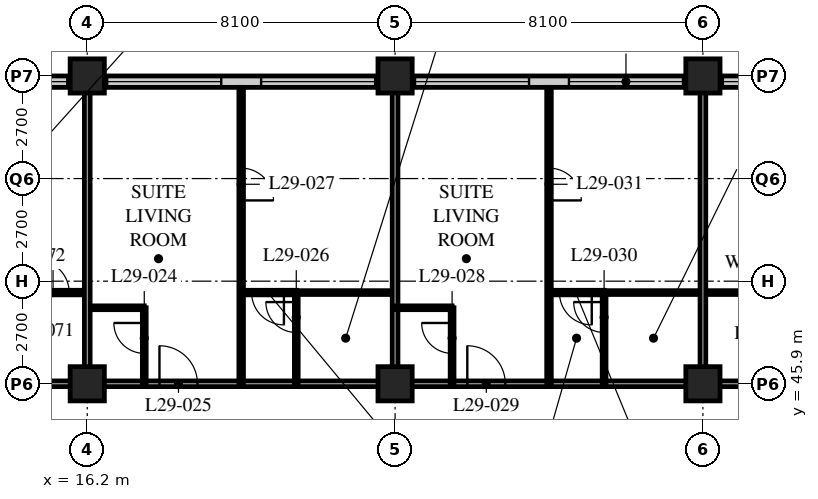
"""IFC4 building model, lengths in metres.
Left out: names, types, materials, properties, quantities, classifications, styles, units other than length and angle.
Written with IfcOpenShell. Run it as: python <this file> out.ifc"""

import sys

from ifc_helpers import new_model, si_unit, direction, frame, frame_2d, origin, origin_2d, place, context, subcontext, project, spatial, rectangle, hollow_rectangle, extrude, element, fill, save


model = new_model("IFC4")
c1 = context("Model", 3, precision=1e-05, world=origin(), true_north=direction((0.0, 1.0)))
c2 = subcontext(c1, "Body", "Model", "MODEL_VIEW")
j1 = project(units=[si_unit("LENGTHUNIT", "METRE"), si_unit("PLANEANGLEUNIT", "RADIAN")], contexts=[c1])
p1 = place(None, origin())
s1 = spatial("IfcSite", under=j1, at=p1, CompositionType="ELEMENT")
p2 = place(p1, origin())
s2 = spatial("IfcBuilding", under=s1, at=p2, CompositionType="ELEMENT")
p3 = place(p2, frame((0.0, 0.0, 117.0)))
s3 = spatial("IfcBuildingStorey", under=s2, at=p3, CompositionType="ELEMENT", Elevation=117.0)
for number, where, z_axis, x_axis in (
    (1, (16.2, 45.9, 0.0), (0.0, 0.0, 1.0), (1.0, 0.0, 0.0)),
    (2, (16.2, 54.0, 0.0), (0.0, 0.0, 1.0), (1.0, 0.0, 0.0)),
    (3, (24.3, 45.9, 0.0), (0.0, 0.0, 1.0), (1.0, 0.0, 0.0)),
    (4, (24.3, 54.0, 0.0), (0.0, 0.0, 1.0), (1.0, 0.0, 0.0)),
    (5, (32.4, 45.9, 0.0), (0.0, 0.0, 1.0), (1.0, 0.0, 0.0)),
    (6, (32.4, 54.0, 0.0), (0.0, 0.0, 1.0), (1.0, 0.0, 0.0)),
):
    element("IfcColumn", number, at=place(p3, frame(where, z_axis=z_axis, x_axis=x_axis)), inside=s3, PredefinedType="COLUMN", context=c2, shape_type="SweptSolid", body=[
        extrude(hollow_rectangle(XDim=0.9, YDim=0.9, WallThickness=0.09, at=origin_2d()), origin(), (0.0, 0.0, 1.0), 3.4),
    ])
p4 = place(p3, frame((48.3, 53.85, 0.0), z_axis=(0.0, 0.0, 1.0), x_axis=(-1.0, 0.0, 0.0)))
e7 = element("IfcWall", 7, at=p4, inside=s3, PredefinedType="SOLIDWALL", context=c2, shape_type="SweptSolid", body=[
    extrude(rectangle(XDim=40.2, YDim=0.3, at=frame_2d((20.1, 0.0))), origin(), (0.0, 0.0, 1.0), 3.19),
])
p5 = place(p4, frame((0.225, 0.0, 0.9)))
e8 = element("IfcOpeningElement", 8, at=p5, cuts=e7, PredefinedType="OPENING", context=c2, shape_type="SweptSolid", body=[
    extrude(rectangle(XDim=3.0, YDim=2.0, at=frame_2d((1.5, 1.0))), frame((0.0, 0.16, 0.0), z_axis=(0.0, -1.0, 0.0), x_axis=(1.0, 0.0, 0.0)), (0.0, 0.0, 1.0), 0.32),
])
p6 = place(p4, frame((4.275, 0.0, 0.9)))
e9 = element("IfcOpeningElement", 9, at=p6, cuts=e7, PredefinedType="OPENING", context=c2, shape_type="SweptSolid", body=[
    extrude(rectangle(XDim=3.0, YDim=2.0, at=frame_2d((1.5, 1.0))), frame((0.0, 0.16, 0.0), z_axis=(0.0, -1.0, 0.0), x_axis=(1.0, 0.0, 0.0)), (0.0, 0.0, 1.0), 0.32),
])
p7 = place(p4, frame((8.325, 0.0, 0.9)))
e10 = element("IfcOpeningElement", 10, at=p7, cuts=e7, PredefinedType="OPENING", context=c2, shape_type="SweptSolid", body=[
    extrude(rectangle(XDim=3.0, YDim=2.0, at=frame_2d((1.5, 1.0))), frame((0.0, 0.16, 0.0), z_axis=(0.0, -1.0, 0.0), x_axis=(1.0, 0.0, 0.0)), (0.0, 0.0, 1.0), 0.32),
])
p8 = place(p4, frame((12.375, 0.0, 0.9)))
e11 = element("IfcOpeningElement", 11, at=p8, cuts=e7, PredefinedType="OPENING", context=c2, shape_type="SweptSolid", body=[
    extrude(rectangle(XDim=3.0, YDim=2.0, at=frame_2d((1.5, 1.0))), frame((0.0, 0.16, 0.0), z_axis=(0.0, -1.0, 0.0), x_axis=(1.0, 0.0, 0.0)), (0.0, 0.0, 1.0), 0.32),
])
p9 = place(p4, frame((16.425, 0.0, 0.9)))
e12 = element("IfcOpeningElement", 12, at=p9, cuts=e7, PredefinedType="OPENING", context=c2, shape_type="SweptSolid", body=[
    extrude(rectangle(XDim=3.0, YDim=2.0, at=frame_2d((1.5, 1.0))), frame((0.0, 0.16, 0.0), z_axis=(0.0, -1.0, 0.0), x_axis=(1.0, 0.0, 0.0)), (0.0, 0.0, 1.0), 0.32),
])
p10 = place(p4, frame((20.475, 0.0, 0.9)))
e13 = element("IfcOpeningElement", 13, at=p10, cuts=e7, PredefinedType="OPENING", context=c2, shape_type="SweptSolid", body=[
    extrude(rectangle(XDim=3.0, YDim=2.0, at=frame_2d((1.5, 1.0))), frame((0.0, 0.16, 0.0), z_axis=(0.0, -1.0, 0.0), x_axis=(1.0, 0.0, 0.0)), (0.0, 0.0, 1.0), 0.32),
])
p11 = place(p4, frame((24.525, 0.0, 0.9)))
e14 = element("IfcOpeningElement", 14, at=p11, cuts=e7, PredefinedType="OPENING", context=c2, shape_type="SweptSolid", body=[
    extrude(rectangle(XDim=3.0, YDim=2.0, at=frame_2d((1.5, 1.0))), frame((0.0, 0.16, 0.0), z_axis=(0.0, -1.0, 0.0), x_axis=(1.0, 0.0, 0.0)), (0.0, 0.0, 1.0), 0.32),
])
p12 = place(p4, frame((28.575, 0.0, 0.9)))
e15 = element("IfcOpeningElement", 15, at=p12, cuts=e7, PredefinedType="OPENING", context=c2, shape_type="SweptSolid", body=[
    extrude(rectangle(XDim=3.0, YDim=2.0, at=frame_2d((1.5, 1.0))), frame((0.0, 0.16, 0.0), z_axis=(0.0, -1.0, 0.0), x_axis=(1.0, 0.0, 0.0)), (0.0, 0.0, 1.0), 0.32),
])
p13 = place(p4, frame((32.625, 0.0, 0.9)))
e16 = element("IfcOpeningElement", 16, at=p13, cuts=e7, PredefinedType="OPENING", context=c2, shape_type="SweptSolid", body=[
    extrude(rectangle(XDim=3.0, YDim=2.0, at=frame_2d((1.5, 1.0))), frame((0.0, 0.16, 0.0), z_axis=(0.0, -1.0, 0.0), x_axis=(1.0, 0.0, 0.0)), (0.0, 0.0, 1.0), 0.32),
])
p14 = place(p4, frame((36.675, 0.0, 0.9)))
e17 = element("IfcOpeningElement", 17, at=p14, cuts=e7, PredefinedType="OPENING", context=c2, shape_type="SweptSolid", body=[
    extrude(rectangle(XDim=3.0, YDim=2.0, at=frame_2d((1.5, 1.0))), frame((0.0, 0.16, 0.0), z_axis=(0.0, -1.0, 0.0), x_axis=(1.0, 0.0, 0.0)), (0.0, 0.0, 1.0), 0.32),
])
p15 = place(p3, frame((12.15, 45.9, 0.0), z_axis=(0.0, 0.0, 1.0), x_axis=(1.0, 0.0, 0.0)))
e18 = element("IfcWall", 18, at=p15, inside=s3, PredefinedType="PARTITIONING", context=c2, shape_type="SweptSolid", body=[
    extrude(rectangle(XDim=32.4, YDim=0.15, at=frame_2d((16.2, 0.0))), origin(), (0.0, 0.0, 1.0), 2.578),
])
p16 = place(p15, frame((5.95, 0.0, 0.0)))
e19 = element("IfcOpeningElement", 19, at=p16, cuts=e18, PredefinedType="OPENING", context=c2, shape_type="SweptSolid", body=[
    extrude(rectangle(XDim=1.0, YDim=2.1, at=frame_2d((0.5, 1.05))), frame((0.0, 0.085, 0.0), z_axis=(0.0, -1.0, 0.0), x_axis=(1.0, 0.0, 0.0)), (0.0, 0.0, 1.0), 0.17),
])
p17 = place(p15, frame((14.05, 0.0, 0.0)))
e20 = element("IfcOpeningElement", 20, at=p17, cuts=e18, PredefinedType="OPENING", context=c2, shape_type="SweptSolid", body=[
    extrude(rectangle(XDim=1.0, YDim=2.1, at=frame_2d((0.5, 1.05))), frame((0.0, 0.085, 0.0), z_axis=(0.0, -1.0, 0.0), x_axis=(1.0, 0.0, 0.0)), (0.0, 0.0, 1.0), 0.17),
])
p18 = place(p15, frame((25.7, 0.0, 0.0)))
e21 = element("IfcOpeningElement", 21, at=p18, cuts=e18, PredefinedType="OPENING", context=c2, shape_type="SweptSolid", body=[
    extrude(rectangle(XDim=1.0, YDim=2.1, at=frame_2d((0.5, 1.05))), frame((0.0, 0.085, 0.0), z_axis=(0.0, -1.0, 0.0), x_axis=(1.0, 0.0, 0.0)), (0.0, 0.0, 1.0), 0.17),
])
p19 = place(p15, frame((29.875, 0.0, 0.0)))
e22 = element("IfcOpeningElement", 22, at=p19, cuts=e18, PredefinedType="OPENING", context=c2, shape_type="SweptSolid", body=[
    extrude(rectangle(XDim=1.0, YDim=2.1, at=frame_2d((0.5, 1.05))), frame((0.0, 0.085, 0.0), z_axis=(0.0, -1.0, 0.0), x_axis=(1.0, 0.0, 0.0)), (0.0, 0.0, 1.0), 0.17),
])
p20 = place(p15, frame((1.525, 0.0, 0.0)))
e23 = element("IfcOpeningElement", 23, at=p20, cuts=e18, PredefinedType="OPENING", context=c2, shape_type="SweptSolid", body=[
    extrude(rectangle(XDim=1.0, YDim=2.1, at=frame_2d((0.5, 1.05))), frame((0.0, 0.085, 0.0), z_axis=(0.0, -1.0, 0.0), x_axis=(1.0, 0.0, 0.0)), (0.0, 0.0, 1.0), 0.17),
])
p21 = place(p3, frame((16.2, 47.9, 0.0), z_axis=(0.0, 0.0, 1.0), x_axis=(1.0, 0.0, 0.0)))
e24 = element("IfcWall", 24, at=p21, inside=s3, PredefinedType="PARTITIONING", context=c2, shape_type="SweptSolid", body=[
    extrude(rectangle(XDim=1.5, YDim=0.1, at=frame_2d((0.75, 0.0))), origin(), (0.0, 0.0, 1.0), 3.19),
])
p22 = place(p3, frame((17.7, 45.9, 0.0), z_axis=(0.0, 0.0, 1.0), x_axis=(0.0, 1.0, 0.0)))
e25 = element("IfcWall", 25, at=p22, inside=s3, PredefinedType="PARTITIONING", context=c2, shape_type="SweptSolid", body=[
    extrude(rectangle(XDim=2.0, YDim=0.1, at=frame_2d((1.0, 0.0))), origin(), (0.0, 0.0, 1.0), 3.19),
])
p23 = place(p22, frame((0.8, 0.0, 0.0)))
e26 = element("IfcOpeningElement", 26, at=p23, cuts=e25, PredefinedType="OPENING", context=c2, shape_type="SweptSolid", body=[
    extrude(rectangle(XDim=0.8, YDim=2.1, at=frame_2d((0.4, 1.05))), frame((0.0, 0.06, 0.0), z_axis=(0.0, -1.0, 0.0), x_axis=(1.0, 0.0, 0.0)), (0.0, 0.0, 1.0), 0.12),
])
p24 = place(p3, frame((21.7, 48.3, 0.0), z_axis=(0.0, 0.0, 1.0), x_axis=(1.0, 0.0, 0.0)))
e27 = element("IfcWall", 27, at=p24, inside=s3, PredefinedType="PARTITIONING", context=c2, shape_type="SweptSolid", body=[
    extrude(rectangle(XDim=2.6, YDim=0.1, at=frame_2d((1.3, 0.0))), origin(), (0.0, 0.0, 1.0), 3.19),
])
p25 = place(p3, frame((21.7, 45.9, 0.0), z_axis=(0.0, 0.0, 1.0), x_axis=(0.0, 1.0, 0.0)))
e28 = element("IfcWall", 28, at=p25, inside=s3, PredefinedType="PARTITIONING", context=c2, shape_type="SweptSolid", body=[
    extrude(rectangle(XDim=2.4, YDim=0.1, at=frame_2d((1.2, 0.0))), origin(), (0.0, 0.0, 1.0), 3.19),
])
p26 = place(p25, frame((1.35, 0.0, 0.0)))
e29 = element("IfcOpeningElement", 29, at=p26, cuts=e28, PredefinedType="OPENING", context=c2, shape_type="SweptSolid", body=[
    extrude(rectangle(XDim=0.8, YDim=2.1, at=frame_2d((0.4, 1.05))), frame((0.0, 0.06, 0.0), z_axis=(0.0, -1.0, 0.0), x_axis=(1.0, 0.0, 0.0)), (0.0, 0.0, 1.0), 0.12),
])
p27 = place(p3, frame((20.25, 45.9, 0.0), z_axis=(0.0, 0.0, 1.0), x_axis=(0.0, 1.0, 0.0)))
e30 = element("IfcWall", 30, at=p27, inside=s3, PredefinedType="PARTITIONING", context=c2, shape_type="SweptSolid", body=[
    extrude(rectangle(XDim=7.8, YDim=0.12, at=frame_2d((3.9, 0.0))), origin(), (0.0, 0.0, 1.0), 3.19),
])
p28 = place(p27, frame((4.825, 0.0, 0.0)))
e31 = element("IfcOpeningElement", 31, at=p28, cuts=e30, PredefinedType="OPENING", context=c2, shape_type="SweptSolid", body=[
    extrude(rectangle(XDim=0.85, YDim=2.1, at=frame_2d((0.425, 1.05))), frame((0.0, 0.07, 0.0), z_axis=(0.0, -1.0, 0.0), x_axis=(1.0, 0.0, 0.0)), (0.0, 0.0, 1.0), 0.14),
])
p29 = place(p3, frame((24.3, 45.9, 0.0), z_axis=(0.0, 0.0, 1.0), x_axis=(0.0, 1.0, 0.0)))
e32 = element("IfcWall", 32, at=p29, inside=s3, PredefinedType="PARTITIONING", context=c2, shape_type="SweptSolid", body=[
    extrude(rectangle(XDim=7.8, YDim=0.15, at=frame_2d((3.9, 0.0))), origin(), (0.0, 0.0, 1.0), 2.578),
])
p30 = place(p3, frame((24.3, 47.9, 0.0), z_axis=(0.0, 0.0, 1.0), x_axis=(1.0, 0.0, 0.0)))
e33 = element("IfcWall", 33, at=p30, inside=s3, PredefinedType="PARTITIONING", context=c2, shape_type="SweptSolid", body=[
    extrude(rectangle(XDim=1.5, YDim=0.1, at=frame_2d((0.75, 0.0))), origin(), (0.0, 0.0, 1.0), 3.19),
])
p31 = place(p3, frame((25.8, 45.9, 0.0), z_axis=(0.0, 0.0, 1.0), x_axis=(0.0, 1.0, 0.0)))
e34 = element("IfcWall", 34, at=p31, inside=s3, PredefinedType="PARTITIONING", context=c2, shape_type="SweptSolid", body=[
    extrude(rectangle(XDim=2.0, YDim=0.1, at=frame_2d((1.0, 0.0))), origin(), (0.0, 0.0, 1.0), 3.19),
])
p32 = place(p31, frame((0.8, 0.0, 0.0)))
e35 = element("IfcOpeningElement", 35, at=p32, cuts=e34, PredefinedType="OPENING", context=c2, shape_type="SweptSolid", body=[
    extrude(rectangle(XDim=0.8, YDim=2.1, at=frame_2d((0.4, 1.05))), frame((0.0, 0.06, 0.0), z_axis=(0.0, -1.0, 0.0), x_axis=(1.0, 0.0, 0.0)), (0.0, 0.0, 1.0), 0.12),
])
p33 = place(p3, frame((29.8, 48.3, 0.0), z_axis=(0.0, 0.0, 1.0), x_axis=(1.0, 0.0, 0.0)))
e36 = element("IfcWall", 36, at=p33, inside=s3, PredefinedType="PARTITIONING", context=c2, shape_type="SweptSolid", body=[
    extrude(rectangle(XDim=7.8, YDim=0.1, at=frame_2d((3.9, 0.0))), origin(), (0.0, 0.0, 1.0), 3.19),
])
p34 = place(p33, frame((3.9, 0.0, 0.0)))
e37 = element("IfcOpeningElement", 37, at=p34, cuts=e36, PredefinedType="OPENING", context=c2, shape_type="SweptSolid", body=[
    extrude(rectangle(XDim=0.8, YDim=2.1, at=frame_2d((0.4, 1.05))), frame((0.0, 0.06, 0.0), z_axis=(0.0, -1.0, 0.0), x_axis=(1.0, 0.0, 0.0)), (0.0, 0.0, 1.0), 0.12),
])
p35 = place(p33, frame((6.5, 0.0, 0.0)))
e38 = element("IfcOpeningElement", 38, at=p35, cuts=e36, PredefinedType="OPENING", context=c2, shape_type="SweptSolid", body=[
    extrude(rectangle(XDim=0.8, YDim=2.1, at=frame_2d((0.4, 1.05))), frame((0.0, 0.06, 0.0), z_axis=(0.0, -1.0, 0.0), x_axis=(1.0, 0.0, 0.0)), (0.0, 0.0, 1.0), 0.12),
])
p36 = place(p3, frame((29.8, 45.9, 0.0), z_axis=(0.0, 0.0, 1.0), x_axis=(0.0, 1.0, 0.0)))
e39 = element("IfcWall", 39, at=p36, inside=s3, PredefinedType="PARTITIONING", context=c2, shape_type="SweptSolid", body=[
    extrude(rectangle(XDim=2.4, YDim=0.1, at=frame_2d((1.2, 0.0))), origin(), (0.0, 0.0, 1.0), 3.19),
])
p37 = place(p36, frame((1.35, 0.0, 0.0)))
e40 = element("IfcOpeningElement", 40, at=p37, cuts=e39, PredefinedType="OPENING", context=c2, shape_type="SweptSolid", body=[
    extrude(rectangle(XDim=0.8, YDim=2.1, at=frame_2d((0.4, 1.05))), frame((0.0, 0.06, 0.0), z_axis=(0.0, -1.0, 0.0), x_axis=(1.0, 0.0, 0.0)), (0.0, 0.0, 1.0), 0.12),
])
p38 = place(p3, frame((28.35, 45.9, 0.0), z_axis=(0.0, 0.0, 1.0), x_axis=(0.0, 1.0, 0.0)))
e41 = element("IfcWall", 41, at=p38, inside=s3, PredefinedType="PARTITIONING", context=c2, shape_type="SweptSolid", body=[
    extrude(rectangle(XDim=7.8, YDim=0.12, at=frame_2d((3.9, 0.0))), origin(), (0.0, 0.0, 1.0), 3.19),
])
p39 = place(p38, frame((4.825, 0.0, 0.0)))
e42 = element("IfcOpeningElement", 42, at=p39, cuts=e41, PredefinedType="OPENING", context=c2, shape_type="SweptSolid", body=[
    extrude(rectangle(XDim=0.85, YDim=2.1, at=frame_2d((0.425, 1.05))), frame((0.0, 0.07, 0.0), z_axis=(0.0, -1.0, 0.0), x_axis=(1.0, 0.0, 0.0)), (0.0, 0.0, 1.0), 0.14),
])
p40 = place(p3, frame((32.4, 45.9, 0.0), z_axis=(0.0, 0.0, 1.0), x_axis=(0.0, 1.0, 0.0)))
e43 = element("IfcWall", 43, at=p40, inside=s3, PredefinedType="PARTITIONING", context=c2, shape_type="SweptSolid", body=[
    extrude(rectangle(XDim=7.8, YDim=0.15, at=frame_2d((3.9, 0.0))), origin(), (0.0, 0.0, 1.0), 2.578),
])
p41 = place(p3, frame((8.15, 48.3, 0.0), z_axis=(0.0, 0.0, 1.0), x_axis=(1.0, 0.0, 0.0)))
e44 = element("IfcWall", 44, at=p41, inside=s3, PredefinedType="PARTITIONING", context=c2, shape_type="SweptSolid", body=[
    extrude(rectangle(XDim=8.05, YDim=0.12, at=frame_2d((4.025, 0.0))), origin(), (0.0, 0.0, 1.0), 3.19),
])
p42 = place(p41, frame((6.725, 0.0, 0.0)))
e45 = element("IfcOpeningElement", 45, at=p42, cuts=e44, PredefinedType="OPENING", context=c2, shape_type="SweptSolid", body=[
    extrude(rectangle(XDim=0.85, YDim=2.1, at=frame_2d((0.425, 1.05))), frame((0.0, 0.07, 0.0), z_axis=(0.0, -1.0, 0.0), x_axis=(1.0, 0.0, 0.0)), (0.0, 0.0, 1.0), 0.14),
])
p43 = place(p41, frame((2.875, 0.0, 0.0)))
e46 = element("IfcOpeningElement", 46, at=p43, cuts=e44, PredefinedType="OPENING", context=c2, shape_type="SweptSolid", body=[
    extrude(rectangle(XDim=0.85, YDim=2.1, at=frame_2d((0.425, 1.05))), frame((0.0, 0.07, 0.0), z_axis=(0.0, -1.0, 0.0), x_axis=(1.0, 0.0, 0.0)), (0.0, 0.0, 1.0), 0.14),
])
p44 = place(p3, frame((16.2, 45.9, 0.0), z_axis=(0.0, 0.0, 1.0), x_axis=(0.0, 1.0, 0.0)))
e47 = element("IfcWall", 47, at=p44, inside=s3, PredefinedType="PARTITIONING", context=c2, shape_type="SweptSolid", body=[
    extrude(rectangle(XDim=7.8, YDim=0.15, at=frame_2d((3.9, 0.0))), origin(), (0.0, 0.0, 1.0), 2.578),
])
p45 = place(p3, frame((20.25, 48.3, 0.0), z_axis=(0.0, 0.0, 1.0), x_axis=(1.0, 0.0, 0.0)))
e48 = element("IfcWall", 48, at=p45, inside=s3, PredefinedType="PARTITIONING", context=c2, shape_type="SweptSolid", body=[
    extrude(rectangle(XDim=1.46, YDim=0.12, at=frame_2d((0.73, 0.0))), origin(), (0.0, 0.0, 1.0), 3.19),
])
p46 = place(p45, frame((0.275, 0.0, 0.0)))
e49 = element("IfcOpeningElement", 49, at=p46, cuts=e48, PredefinedType="OPENING", context=c2, shape_type="SweptSolid", body=[
    extrude(rectangle(XDim=0.85, YDim=2.1, at=frame_2d((0.425, 1.05))), frame((0.0, 0.07, 0.0), z_axis=(0.0, -1.0, 0.0), x_axis=(1.0, 0.0, 0.0)), (0.0, 0.0, 1.0), 0.14),
])
p47 = place(p3, frame((28.35, 48.3, 0.0), z_axis=(0.0, 0.0, 1.0), x_axis=(1.0, 0.0, 0.0)))
e50 = element("IfcWall", 50, at=p47, inside=s3, PredefinedType="PARTITIONING", context=c2, shape_type="SweptSolid", body=[
    extrude(rectangle(XDim=1.46, YDim=0.12, at=frame_2d((0.73, 0.0))), origin(), (0.0, 0.0, 1.0), 3.19),
])
p48 = place(p47, frame((0.275, 0.0, 0.0)))
e51 = element("IfcOpeningElement", 51, at=p48, cuts=e50, PredefinedType="OPENING", context=c2, shape_type="SweptSolid", body=[
    extrude(rectangle(XDim=0.85, YDim=2.1, at=frame_2d((0.425, 1.05))), frame((0.0, 0.07, 0.0), z_axis=(0.0, -1.0, 0.0), x_axis=(1.0, 0.0, 0.0)), (0.0, 0.0, 1.0), 0.14),
])
p49 = place(p8, origin())
e52 = element("IfcWindow", 52, at=p49, inside=s3, PartitioningType="SINGLE_PANEL", PredefinedType="WINDOW", context=c2, shape_type="SweptSolid", body=[
    extrude(rectangle(XDim=3.0, YDim=2.0, at=frame_2d((1.5, 1.0))), frame((0.0, 0.03, 0.0), z_axis=(0.0, -1.0, 0.0), x_axis=(1.0, 0.0, 0.0)), (0.0, 0.0, 1.0), 0.06),
])
fill(e11, e52)
p50 = place(p9, origin())
e53 = element("IfcWindow", 53, at=p50, inside=s3, PartitioningType="SINGLE_PANEL", PredefinedType="WINDOW", context=c2, shape_type="SweptSolid", body=[
    extrude(rectangle(XDim=3.0, YDim=2.0, at=frame_2d((1.5, 1.0))), frame((0.0, 0.03, 0.0), z_axis=(0.0, -1.0, 0.0), x_axis=(1.0, 0.0, 0.0)), (0.0, 0.0, 1.0), 0.06),
])
fill(e12, e53)
p51 = place(p10, origin())
e54 = element("IfcWindow", 54, at=p51, inside=s3, PartitioningType="SINGLE_PANEL", PredefinedType="WINDOW", context=c2, shape_type="SweptSolid", body=[
    extrude(rectangle(XDim=3.0, YDim=2.0, at=frame_2d((1.5, 1.0))), frame((0.0, 0.03, 0.0), z_axis=(0.0, -1.0, 0.0), x_axis=(1.0, 0.0, 0.0)), (0.0, 0.0, 1.0), 0.06),
])
fill(e13, e54)
p52 = place(p11, origin())
e55 = element("IfcWindow", 55, at=p52, inside=s3, PartitioningType="SINGLE_PANEL", PredefinedType="WINDOW", context=c2, shape_type="SweptSolid", body=[
    extrude(rectangle(XDim=3.0, YDim=2.0, at=frame_2d((1.5, 1.0))), frame((0.0, 0.03, 0.0), z_axis=(0.0, -1.0, 0.0), x_axis=(1.0, 0.0, 0.0)), (0.0, 0.0, 1.0), 0.06),
])
fill(e14, e55)
p53 = place(p12, origin())
e56 = element("IfcWindow", 56, at=p53, inside=s3, PartitioningType="SINGLE_PANEL", PredefinedType="WINDOW", context=c2, shape_type="SweptSolid", body=[
    extrude(rectangle(XDim=3.0, YDim=2.0, at=frame_2d((1.5, 1.0))), frame((0.0, 0.03, 0.0), z_axis=(0.0, -1.0, 0.0), x_axis=(1.0, 0.0, 0.0)), (0.0, 0.0, 1.0), 0.06),
])
fill(e15, e56)
p54 = place(p13, origin())
e57 = element("IfcWindow", 57, at=p54, inside=s3, PartitioningType="SINGLE_PANEL", PredefinedType="WINDOW", context=c2, shape_type="SweptSolid", body=[
    extrude(rectangle(XDim=3.0, YDim=2.0, at=frame_2d((1.5, 1.0))), frame((0.0, 0.03, 0.0), z_axis=(0.0, -1.0, 0.0), x_axis=(1.0, 0.0, 0.0)), (0.0, 0.0, 1.0), 0.06),
])
fill(e16, e57)
p55 = place(p23, origin())
e58 = element("IfcDoor", 58, at=p55, inside=s3, OperationType="SINGLE_SWING_RIGHT", PredefinedType="DOOR", context=c2, shape_type="SweptSolid", body=[
    extrude(rectangle(XDim=0.8, YDim=2.1, at=frame_2d((0.4, 1.05))), frame((0.0, 0.025, 0.0), z_axis=(0.0, -1.0, 0.0), x_axis=(1.0, 0.0, 0.0)), (0.0, 0.0, 1.0), 0.05),
])
fill(e26, e58)
p56 = place(p16, origin())
e59 = element("IfcDoor", 59, at=p56, inside=s3, OperationType="SINGLE_SWING_LEFT", PredefinedType="DOOR", context=c2, shape_type="SweptSolid", body=[
    extrude(rectangle(XDim=1.0, YDim=2.1, at=frame_2d((0.5, 1.05))), frame((0.0, 0.025, 0.0), z_axis=(0.0, -1.0, 0.0), x_axis=(1.0, 0.0, 0.0)), (0.0, 0.0, 1.0), 0.05),
])
fill(e19, e59)
p57 = place(p26, origin())
e60 = element("IfcDoor", 60, at=p57, inside=s3, OperationType="SINGLE_SWING_RIGHT", PredefinedType="DOOR", context=c2, shape_type="SweptSolid", body=[
    extrude(rectangle(XDim=0.8, YDim=2.1, at=frame_2d((0.4, 1.05))), frame((0.0, 0.025, 0.0), z_axis=(0.0, -1.0, 0.0), x_axis=(1.0, 0.0, 0.0)), (0.0, 0.0, 1.0), 0.05),
])
fill(e29, e60)
p58 = place(p28, origin())
e61 = element("IfcDoor", 61, at=p58, inside=s3, OperationType="SINGLE_SWING_RIGHT", PredefinedType="DOOR", context=c2, shape_type="SweptSolid", body=[
    extrude(rectangle(XDim=0.85, YDim=2.1, at=frame_2d((0.425, 1.05))), frame((0.0, 0.025, 0.0), z_axis=(0.0, -1.0, 0.0), x_axis=(1.0, 0.0, 0.0)), (0.0, 0.0, 1.0), 0.05),
])
fill(e31, e61)
p59 = place(p32, origin())
e62 = element("IfcDoor", 62, at=p59, inside=s3, OperationType="SINGLE_SWING_RIGHT", PredefinedType="DOOR", context=c2, shape_type="SweptSolid", body=[
    extrude(rectangle(XDim=0.8, YDim=2.1, at=frame_2d((0.4, 1.05))), frame((0.0, 0.025, 0.0), z_axis=(0.0, -1.0, 0.0), x_axis=(1.0, 0.0, 0.0)), (0.0, 0.0, 1.0), 0.05),
])
fill(e35, e62)
p60 = place(p17, origin())
e63 = element("IfcDoor", 63, at=p60, inside=s3, OperationType="SINGLE_SWING_LEFT", PredefinedType="DOOR", context=c2, shape_type="SweptSolid", body=[
    extrude(rectangle(XDim=1.0, YDim=2.1, at=frame_2d((0.5, 1.05))), frame((0.0, 0.025, 0.0), z_axis=(0.0, -1.0, 0.0), x_axis=(1.0, 0.0, 0.0)), (0.0, 0.0, 1.0), 0.05),
])
fill(e20, e63)
p61 = place(p37, origin())
e64 = element("IfcDoor", 64, at=p61, inside=s3, OperationType="SINGLE_SWING_RIGHT", PredefinedType="DOOR", context=c2, shape_type="SweptSolid", body=[
    extrude(rectangle(XDim=0.8, YDim=2.1, at=frame_2d((0.4, 1.05))), frame((0.0, 0.025, 0.0), z_axis=(0.0, -1.0, 0.0), x_axis=(1.0, 0.0, 0.0)), (0.0, 0.0, 1.0), 0.05),
])
fill(e40, e64)
p62 = place(p39, origin())
e65 = element("IfcDoor", 65, at=p62, inside=s3, OperationType="SINGLE_SWING_RIGHT", PredefinedType="DOOR", context=c2, shape_type="SweptSolid", body=[
    extrude(rectangle(XDim=0.85, YDim=2.1, at=frame_2d((0.425, 1.05))), frame((0.0, 0.025, 0.0), z_axis=(0.0, -1.0, 0.0), x_axis=(1.0, 0.0, 0.0)), (0.0, 0.0, 1.0), 0.05),
])
fill(e42, e65)
p63 = place(p42, origin())
e66 = element("IfcDoor", 66, at=p63, inside=s3, OperationType="SINGLE_SWING_LEFT", PredefinedType="DOOR", context=c2, shape_type="SweptSolid", body=[
    extrude(rectangle(XDim=0.85, YDim=2.1, at=frame_2d((0.425, 1.05))), frame((0.0, 0.025, 0.0), z_axis=(0.0, -1.0, 0.0), x_axis=(1.0, 0.0, 0.0)), (0.0, 0.0, 1.0), 0.05),
])
fill(e45, e66)
p64 = place(p46, origin())
e67 = element("IfcDoor", 67, at=p64, inside=s3, OperationType="SINGLE_SWING_LEFT", PredefinedType="DOOR", context=c2, shape_type="SweptSolid", body=[
    extrude(rectangle(XDim=0.85, YDim=2.1, at=frame_2d((0.425, 1.05))), frame((0.0, 0.025, 0.0), z_axis=(0.0, -1.0, 0.0), x_axis=(1.0, 0.0, 0.0)), (0.0, 0.0, 1.0), 0.05),
])
fill(e49, e67)
p65 = place(p48, origin())
e68 = element("IfcDoor", 68, at=p65, inside=s3, OperationType="SINGLE_SWING_LEFT", PredefinedType="DOOR", context=c2, shape_type="SweptSolid", body=[
    extrude(rectangle(XDim=0.85, YDim=2.1, at=frame_2d((0.425, 1.05))), frame((0.0, 0.025, 0.0), z_axis=(0.0, -1.0, 0.0), x_axis=(1.0, 0.0, 0.0)), (0.0, 0.0, 1.0), 0.05),
])
fill(e51, e68)
save(model, sys.argv[1])
